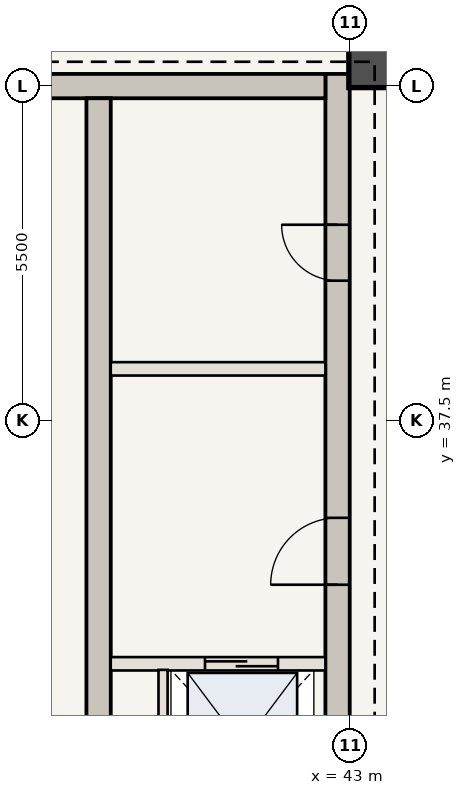
"""IFC4 building model, lengths in metres.
Left out: names, types, materials, properties, quantities, classifications, styles, units other than length and angle.
Written with IfcOpenShell. Run it as: python <this file> out.ifc"""

import sys

from ifc_helpers import new_model, si_unit, direction, frame, frame_2d, origin, origin_2d, place, context, subcontext, project, spatial, rectangle, extrude, element, fill, save


model = new_model("IFC4")
c1 = context("Model", 3, precision=1e-05, world=origin(), true_north=direction((0.0, 1.0)))
c2 = subcontext(c1, "Body", "Model", "MODEL_VIEW")
j1 = project(units=[si_unit("LENGTHUNIT", "METRE"), si_unit("PLANEANGLEUNIT", "RADIAN")], contexts=[c1])
p1 = place(None, origin())
s1 = spatial("IfcSite", under=j1, at=p1, CompositionType="ELEMENT")
p2 = place(p1, origin())
s2 = spatial("IfcBuilding", under=s1, at=p2, CompositionType="ELEMENT")
p3 = place(p2, frame((0.0, 0.0, 296.8)))
s3 = spatial("IfcBuildingStorey", under=s2, at=p3, CompositionType="ELEMENT", Elevation=296.8)
p4 = place(p3, frame((42.79, 30.6, 0.0), z_axis=(0.0, 0.0, 1.0), x_axis=(0.0, 1.0, 0.0)))
e1 = element("IfcWall", 1, at=p4, inside=s3, PredefinedType="SHEAR", context=c2, shape_type="SweptSolid", body=[
    extrude(rectangle(XDim=12.6, YDim=0.4, at=frame_2d((6.3, 0.0))), origin(), (0.0, 0.0, 1.0), 3.85),
])
p5 = place(p4, frame((4.2, 0.0, 0.0)))
e2 = element("IfcOpeningElement", 2, at=p5, cuts=e1, PredefinedType="OPENING", context=c2, shape_type="SweptSolid", body=[
    extrude(rectangle(XDim=1.1, YDim=2.15, at=frame_2d((0.55, 1.075))), frame((0.0, 0.21, 0.0), z_axis=(0.0, -1.0, 0.0), x_axis=(1.0, 0.0, 0.0)), (0.0, 0.0, 1.0), 0.42),
])
p6 = place(p4, frame((9.2, 0.0, 0.0)))
e3 = element("IfcOpeningElement", 3, at=p6, cuts=e1, PredefinedType="OPENING", context=c2, shape_type="SweptSolid", body=[
    extrude(rectangle(XDim=0.92, YDim=2.1, at=frame_2d((0.46, 1.05))), frame((0.0, 0.21, 0.0), z_axis=(0.0, -1.0, 0.0), x_axis=(1.0, 0.0, 0.0)), (0.0, 0.0, 1.0), 0.42),
])
p7 = place(p3, frame((37.75, 43.0, 0.0), z_axis=(0.0, 0.0, 1.0), x_axis=(1.0, 0.0, 0.0)))
e4 = element("IfcWall", 4, at=p7, inside=s3, PredefinedType="SHEAR", context=c2, shape_type="SweptSolid", body=[
    extrude(rectangle(XDim=4.84, YDim=0.4, at=frame_2d((2.42, 0.0))), origin(), (0.0, 0.0, 1.0), 3.85),
])
p8 = place(p3, frame((38.86, 30.6, 0.0), z_axis=(0.0, 0.0, 1.0), x_axis=(0.0, 1.0, 0.0)))
e5 = element("IfcWall", 5, at=p8, inside=s3, PredefinedType="SHEAR", context=c2, shape_type="SweptSolid", body=[
    extrude(rectangle(XDim=12.2, YDim=0.4, at=frame_2d((6.1, 0.0))), origin(), (0.0, 0.0, 1.0), 3.85),
])
p9 = place(p3, frame((43.35, 43.35, 0.0), z_axis=(0.0, 0.0, 1.0), x_axis=(1.0, 0.0, 0.0)))
e6 = element("IfcColumn", 6, at=p9, inside=s3, PredefinedType="COLUMN", context=c2, shape_type="SweptSolid", body=[
    extrude(rectangle(XDim=0.75, YDim=0.75, at=origin_2d()), origin(), (0.0, 0.0, 1.0), 3.85),
])
p10 = place(p3, frame((39.06, 33.5, 0.0), z_axis=(0.0, 0.0, 1.0), x_axis=(1.0, 0.0, 0.0)))
e7 = element("IfcWall", 7, at=p10, inside=s3, PredefinedType="STANDARD", context=c2, shape_type="SweptSolid", body=[
    extrude(rectangle(XDim=3.53, YDim=0.22, at=frame_2d((1.765, 0.0))), origin(), (0.0, 0.0, 1.0), 3.685),
])
p11 = place(p10, frame((1.55, 0.0, 0.0)))
e8 = element("IfcOpeningElement", 8, at=p11, cuts=e7, PredefinedType="OPENING", context=c2, shape_type="SweptSolid", body=[
    extrude(rectangle(XDim=1.2, YDim=2.2, at=frame_2d((0.6, 1.1))), frame((0.0, 0.12, 0.0), z_axis=(0.0, -1.0, 0.0), x_axis=(1.0, 0.0, 0.0)), (0.0, 0.0, 1.0), 0.24),
])
p12 = place(p3, frame((39.92, 30.75, 0.0), z_axis=(0.0, 0.0, 1.0), x_axis=(0.0, 1.0, 0.0)))
e9 = element("IfcWall", 9, at=p12, inside=s3, PredefinedType="STANDARD", context=c2, shape_type="SweptSolid", body=[
    extrude(rectangle(XDim=2.65, YDim=0.15, at=frame_2d((1.325, 0.0))), origin(), (0.0, 0.0, 1.0), 3.685),
])
p13 = place(p3, frame((39.06, 38.35, 0.0), z_axis=(0.0, 0.0, 1.0), x_axis=(1.0, 0.0, 0.0)))
e10 = element("IfcWall", 10, at=p13, inside=s3, PredefinedType="STANDARD", context=c2, shape_type="SweptSolid", body=[
    extrude(rectangle(XDim=3.53, YDim=0.22, at=frame_2d((1.765, 0.0))), origin(), (0.0, 0.0, 1.0), 3.685),
])
p14 = place(p5, origin())
e11 = element("IfcDoor", 11, at=p14, inside=s3, OperationType="SINGLE_SWING_LEFT", PredefinedType="DOOR", context=c2, shape_type="SweptSolid", body=[
    extrude(rectangle(XDim=1.1, YDim=2.15, at=frame_2d((0.55, 1.075))), frame((0.0, 0.025, 0.0), z_axis=(0.0, -1.0, 0.0), x_axis=(1.0, 0.0, 0.0)), (0.0, 0.0, 1.0), 0.05),
])
fill(e2, e11)
p15 = place(p6, origin())
e12 = element("IfcDoor", 12, at=p15, inside=s3, OperationType="SINGLE_SWING_RIGHT", PredefinedType="DOOR", context=c2, shape_type="SweptSolid", body=[
    extrude(rectangle(XDim=0.92, YDim=2.1, at=frame_2d((0.46, 1.05))), frame((0.0, 0.025, 0.0), z_axis=(0.0, -1.0, 0.0), x_axis=(1.0, 0.0, 0.0)), (0.0, 0.0, 1.0), 0.05),
])
fill(e3, e12)
p16 = place(p11, origin())
e13 = element("IfcDoor", 13, at=p16, inside=s3, OperationType="DOUBLE_DOOR_SLIDING", PredefinedType="DOOR", context=c2, shape_type="SweptSolid", body=[
    extrude(rectangle(XDim=1.2, YDim=2.2, at=frame_2d((0.6, 1.1))), frame((0.0, 0.025, 0.0), z_axis=(0.0, -1.0, 0.0), x_axis=(1.0, 0.0, 0.0)), (0.0, 0.0, 1.0), 0.05),
])
fill(e8, e13)
save(model, sys.argv[1])
